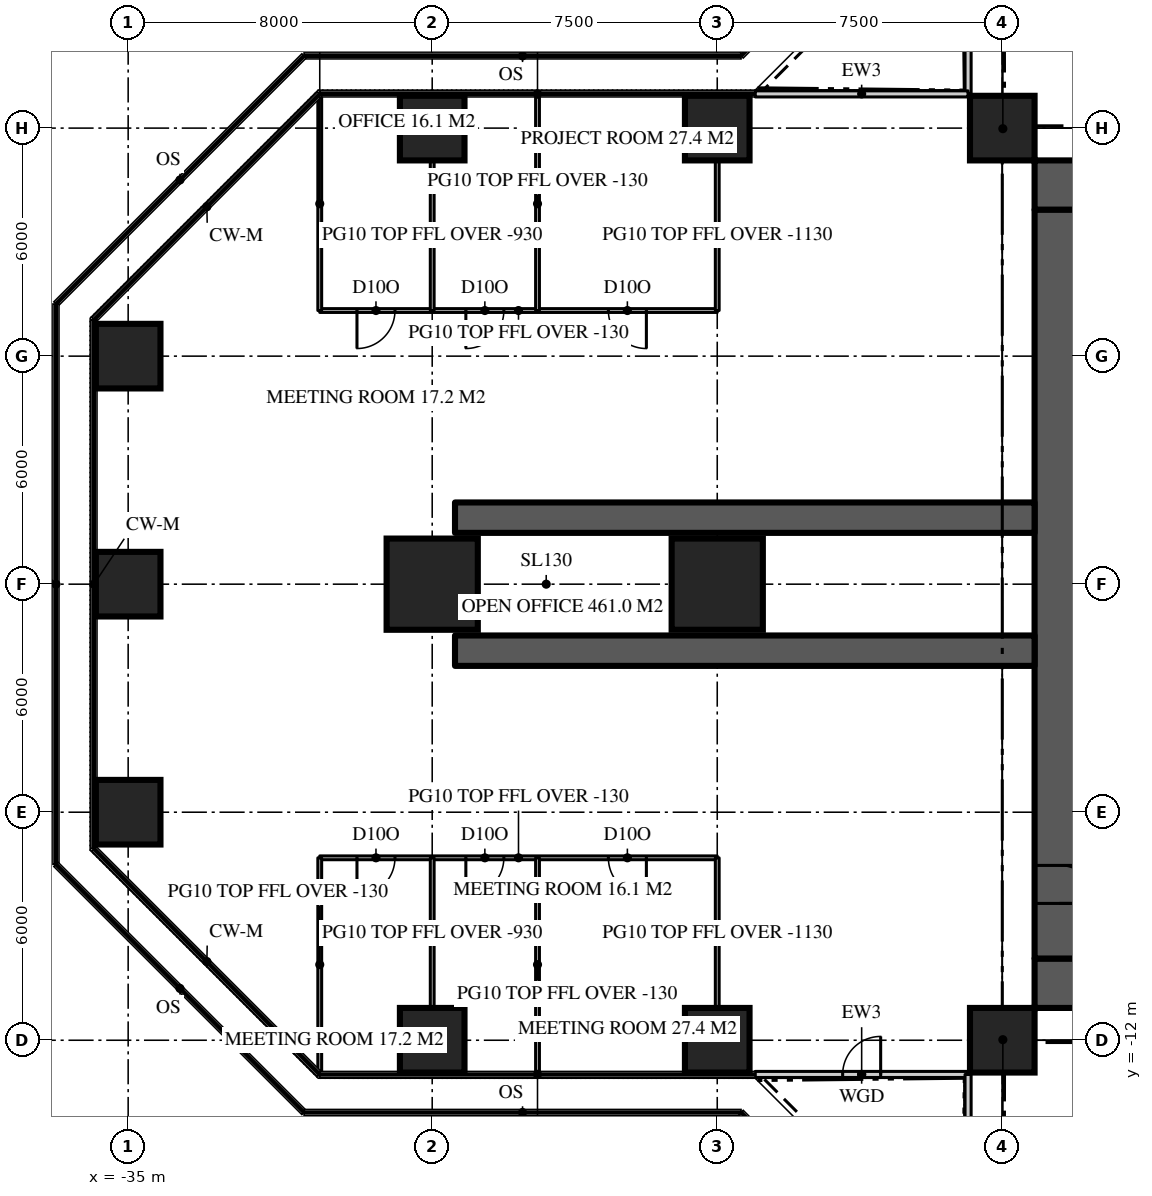
"""IFC4 building model, lengths in metres.
Left out: names, types, materials, properties, quantities, classifications, styles, units other than length and angle.
Written with IfcOpenShell. Run it as: python <this file> out.ifc"""

import sys

from ifc_helpers import new_model, si_unit, direction, frame, frame_2d, origin, origin_2d, place, context, subcontext, project, spatial, rectangle, extrude, element, fill, save


model = new_model("IFC4")
c1 = context("Model", 3, precision=1e-05, world=origin(), true_north=direction((0.0, 1.0)))
c2 = subcontext(c1, "Body", "Model", "MODEL_VIEW")
j1 = project(units=[si_unit("LENGTHUNIT", "METRE"), si_unit("PLANEANGLEUNIT", "RADIAN")], contexts=[c1])
p1 = place(None, origin())
s1 = spatial("IfcSite", under=j1, at=p1, CompositionType="ELEMENT")
p2 = place(p1, origin())
s2 = spatial("IfcBuilding", under=s1, at=p2, CompositionType="ELEMENT")
p3 = place(p2, frame((0.0, 0.0, 174.9)))
s3 = spatial("IfcBuildingStorey", under=s2, at=p3, CompositionType="ELEMENT", Elevation=174.9)
p4 = place(p3, frame((-11.15, 10.5, 0.0), z_axis=(0.0, 0.0, 1.0), x_axis=(1.0, 0.0, 0.0)))
e1 = element("IfcWall", 1, at=p4, inside=s3, PredefinedType="SHEAR", context=c2, shape_type="SweptSolid", body=[
    extrude(rectangle(XDim=22.3, YDim=1.3, at=frame_2d((11.15, 0.0))), origin(), (0.0, 0.0, 1.0), 3.9),
])
p5 = place(p4, frame((4.25, 0.0, 0.0)))
e2 = element("IfcOpeningElement", 2, at=p5, cuts=e1, PredefinedType="OPENING", context=c2, shape_type="SweptSolid", body=[
    extrude(rectangle(XDim=1.8, YDim=2.2, at=frame_2d((0.9, 1.1))), frame((0.0, 0.66, 0.0), z_axis=(0.0, -1.0, 0.0), x_axis=(1.0, 0.0, 0.0)), (0.0, 0.0, 1.0), 1.32),
])
p6 = place(p4, frame((16.25, 0.0, 0.0)))
e3 = element("IfcOpeningElement", 3, at=p6, cuts=e1, PredefinedType="OPENING", context=c2, shape_type="SweptSolid", body=[
    extrude(rectangle(XDim=1.8, YDim=2.2, at=frame_2d((0.9, 1.1))), frame((0.0, 0.66, 0.0), z_axis=(0.0, -1.0, 0.0), x_axis=(1.0, 0.0, 0.0)), (0.0, 0.0, 1.0), 1.32),
])
p7 = place(p3, frame((11.15, -10.5, 0.0), z_axis=(0.0, 0.0, 1.0), x_axis=(-1.0, 0.0, 0.0)))
e4 = element("IfcWall", 4, at=p7, inside=s3, PredefinedType="SHEAR", context=c2, shape_type="SweptSolid", body=[
    extrude(rectangle(XDim=22.3, YDim=1.3, at=frame_2d((11.15, 0.0))), origin(), (0.0, 0.0, 1.0), 3.9),
])
p8 = place(p7, frame((16.25, 0.0, 0.0)))
e5 = element("IfcOpeningElement", 5, at=p8, cuts=e4, PredefinedType="OPENING", context=c2, shape_type="SweptSolid", body=[
    extrude(rectangle(XDim=1.8, YDim=2.2, at=frame_2d((0.9, 1.1))), frame((0.0, 0.66, 0.0), z_axis=(0.0, -1.0, 0.0), x_axis=(1.0, 0.0, 0.0)), (0.0, 0.0, 1.0), 1.32),
])
p9 = place(p7, frame((4.25, 0.0, 0.0)))
e6 = element("IfcOpeningElement", 6, at=p9, cuts=e4, PredefinedType="OPENING", context=c2, shape_type="SweptSolid", body=[
    extrude(rectangle(XDim=1.8, YDim=2.2, at=frame_2d((0.9, 1.1))), frame((0.0, 0.66, 0.0), z_axis=(0.0, -1.0, 0.0), x_axis=(1.0, 0.0, 0.0)), (0.0, 0.0, 1.0), 1.32),
])
p10 = place(p3, frame((-10.5, 9.85, 0.0), z_axis=(0.0, 0.0, 1.0), x_axis=(0.0, -1.0, 0.0)))
e7 = element("IfcWall", 7, at=p10, inside=s3, PredefinedType="SHEAR", context=c2, shape_type="SweptSolid", body=[
    extrude(rectangle(XDim=19.7, YDim=1.3, at=frame_2d((9.85, 0.0))), origin(), (0.0, 0.0, 1.0), 3.9),
])
p11 = place(p10, frame((17.25, 0.0, 0.0)))
e8 = element("IfcOpeningElement", 8, at=p11, cuts=e7, PredefinedType="OPENING", context=c2, shape_type="SweptSolid", body=[
    extrude(rectangle(XDim=1.0, YDim=2.2, at=frame_2d((0.5, 1.1))), frame((0.0, 0.66, 0.0), z_axis=(0.0, -1.0, 0.0), x_axis=(1.0, 0.0, 0.0)), (0.0, 0.0, 1.0), 1.32),
])
for number, where, z_axis, x_axis in (
    (9, (-11.15, 1.75, 0.0), (0.0, 0.0, 1.0), (-1.0, 0.0, 0.0)),
    (10, (-11.15, -1.75, 0.0), (0.0, 0.0, 1.0), (-1.0, 0.0, 0.0)),
):
    element("IfcWall", number, at=place(p3, frame(where, z_axis=z_axis, x_axis=x_axis)), inside=s3, PredefinedType="SHEAR", context=c2, shape_type="SweptSolid", body=[
        extrude(rectangle(XDim=15.25, YDim=0.8, at=frame_2d((7.625, 0.0))), origin(), (0.0, 0.0, 1.0), 3.9),
    ])
for number, where, z_axis, x_axis in (
    (11, (-27.0, -12.0, 0.0), (0.0, 0.0, 1.0), (1.0, 0.0, 0.0)),
    (12, (-19.5, -12.0, 0.0), (0.0, 0.0, 1.0), (1.0, 0.0, 0.0)),
    (13, (-12.0, -12.0, 0.0), (0.0, 0.0, 1.0), (1.0, 0.0, 0.0)),
    (14, (-35.0, -6.0, 0.0), (0.0, 0.0, 1.0), (1.0, 0.0, 0.0)),
    (15, (-35.0, 0.0, 0.0), (0.0, 0.0, 1.0), (1.0, 0.0, 0.0)),
):
    element("IfcColumn", number, at=place(p3, frame(where, z_axis=z_axis, x_axis=x_axis)), inside=s3, PredefinedType="COLUMN", context=c2, shape_type="SweptSolid", body=[
        extrude(rectangle(XDim=1.7, YDim=1.7, at=origin_2d()), origin(), (0.0, 0.0, 1.0), 3.9),
    ])
for number, where, z_axis, x_axis in (
    (16, (-27.0, 0.0, 0.0), (0.0, 0.0, 1.0), (1.0, 0.0, 0.0)),
    (17, (-19.5, 0.0, 0.0), (0.0, 0.0, 1.0), (1.0, 0.0, 0.0)),
):
    element("IfcColumn", number, at=place(p3, frame(where, z_axis=z_axis, x_axis=x_axis)), inside=s3, PredefinedType="COLUMN", context=c2, shape_type="SweptSolid", body=[
        extrude(rectangle(XDim=2.4, YDim=2.4, at=origin_2d()), origin(), (0.0, 0.0, 1.0), 3.9),
    ])
for number, where, z_axis, x_axis in (
    (18, (-35.0, 6.0, 0.0), (0.0, 0.0, 1.0), (1.0, 0.0, 0.0)),
    (19, (-27.0, 12.0, 0.0), (0.0, 0.0, 1.0), (1.0, 0.0, 0.0)),
    (20, (-19.5, 12.0, 0.0), (0.0, 0.0, 1.0), (1.0, 0.0, 0.0)),
    (21, (-12.0, 12.0, 0.0), (0.0, 0.0, 1.0), (1.0, 0.0, 0.0)),
):
    element("IfcColumn", number, at=place(p3, frame(where, z_axis=z_axis, x_axis=x_axis)), inside=s3, PredefinedType="COLUMN", context=c2, shape_type="SweptSolid", body=[
        extrude(rectangle(XDim=1.7, YDim=1.7, at=origin_2d()), origin(), (0.0, 0.0, 1.0), 3.9),
    ])
p12 = place(p3, frame((-12.9, 18.5, 0.0), z_axis=(0.0, 0.0, 1.0), x_axis=(0.0, -1.0, 0.0)))
e22 = element("IfcWall", 22, at=p12, inside=s3, PredefinedType="SOLIDWALL", context=c2, shape_type="SweptSolid", body=[
    extrude(rectangle(XDim=5.6, YDim=0.16, at=frame_2d((2.8, 0.0))), origin(), (0.0, 0.0, 1.0), 3.77),
])
p13 = place(p12, frame((2.3, 0.0, 0.0)))
e23 = element("IfcOpeningElement", 23, at=p13, cuts=e22, PredefinedType="OPENING", context=c2, shape_type="SweptSolid", body=[
    extrude(rectangle(XDim=1.0, YDim=2.2, at=frame_2d((0.5, 1.1))), frame((0.0, 0.09, 0.0), z_axis=(0.0, -1.0, 0.0), x_axis=(1.0, 0.0, 0.0)), (0.0, 0.0, 1.0), 0.18),
])
p14 = place(p3, frame((-12.9, 12.9, 0.0), z_axis=(0.0, 0.0, 1.0), x_axis=(-1.0, 0.0, 0.0)))
e24 = element("IfcWall", 24, at=p14, inside=s3, PredefinedType="SOLIDWALL", context=c2, shape_type="SweptSolid", body=[
    extrude(rectangle(XDim=5.6, YDim=0.16, at=frame_2d((2.8, 0.0))), origin(), (0.0, 0.0, 1.0), 3.77),
])
p15 = place(p3, frame((-18.5, -12.9, 0.0), z_axis=(0.0, 0.0, 1.0), x_axis=(1.0, 0.0, 0.0)))
e25 = element("IfcWall", 25, at=p15, inside=s3, PredefinedType="SOLIDWALL", context=c2, shape_type="SweptSolid", body=[
    extrude(rectangle(XDim=5.6, YDim=0.16, at=frame_2d((2.8, 0.0))), origin(), (0.0, 0.0, 1.0), 3.77),
])
p16 = place(p15, frame((2.3, 0.0, 0.0)))
e26 = element("IfcOpeningElement", 26, at=p16, cuts=e25, PredefinedType="OPENING", context=c2, shape_type="SweptSolid", body=[
    extrude(rectangle(XDim=1.0, YDim=2.2, at=frame_2d((0.5, 1.1))), frame((0.0, 0.09, 0.0), z_axis=(0.0, -1.0, 0.0), x_axis=(1.0, 0.0, 0.0)), (0.0, 0.0, 1.0), 0.18),
])
p17 = place(p3, frame((-12.9, -12.9, 0.0), z_axis=(0.0, 0.0, 1.0), x_axis=(0.0, -1.0, 0.0)))
e27 = element("IfcWall", 27, at=p17, inside=s3, PredefinedType="SOLIDWALL", context=c2, shape_type="SweptSolid", body=[
    extrude(rectangle(XDim=5.6, YDim=0.16, at=frame_2d((2.8, 0.0))), origin(), (0.0, 0.0, 1.0), 3.77),
])
p18 = place(p3, frame((-19.5, -7.2, 0.0), z_axis=(0.0, 0.0, 1.0), x_axis=(-1.0, 0.0, 0.0)))
e28 = element("IfcWall", 28, at=p18, inside=s3, PredefinedType="PARTITIONING", context=c2, shape_type="SweptSolid", body=[
    extrude(rectangle(XDim=10.459, YDim=0.1, at=frame_2d((5.229, 0.0))), origin(), (0.0, 0.0, 1.0), 3.77),
])
p19 = place(p18, frame((1.865, 0.0, 0.0)))
e29 = element("IfcOpeningElement", 29, at=p19, cuts=e28, PredefinedType="OPENING", context=c2, shape_type="SweptSolid", body=[
    extrude(rectangle(XDim=1.0, YDim=2.2, at=frame_2d((0.5, 1.1))), frame((0.0, 0.06, 0.0), z_axis=(0.0, -1.0, 0.0), x_axis=(1.0, 0.0, 0.0)), (0.0, 0.0, 1.0), 0.12),
])
p20 = place(p18, frame((5.615, 0.0, 0.0)))
e30 = element("IfcOpeningElement", 30, at=p20, cuts=e28, PredefinedType="OPENING", context=c2, shape_type="SweptSolid", body=[
    extrude(rectangle(XDim=1.0, YDim=2.2, at=frame_2d((0.5, 1.1))), frame((0.0, 0.06, 0.0), z_axis=(0.0, -1.0, 0.0), x_axis=(1.0, 0.0, 0.0)), (0.0, 0.0, 1.0), 0.12),
])
p21 = place(p18, frame((8.479, 0.0, 0.0)))
e31 = element("IfcOpeningElement", 31, at=p21, cuts=e28, PredefinedType="OPENING", context=c2, shape_type="SweptSolid", body=[
    extrude(rectangle(XDim=1.0, YDim=2.2, at=frame_2d((0.5, 1.1))), frame((0.0, 0.06, 0.0), z_axis=(0.0, -1.0, 0.0), x_axis=(1.0, 0.0, 0.0)), (0.0, 0.0, 1.0), 0.12),
])
p22 = place(p3, frame((-19.5, -7.2, 0.0), z_axis=(0.0, 0.0, 1.0), x_axis=(0.0, -1.0, 0.0)))
e32 = element("IfcWall", 32, at=p22, inside=s3, PredefinedType="PARTITIONING", context=c2, shape_type="SweptSolid", body=[
    extrude(rectangle(XDim=3.95, YDim=0.1, at=frame_2d((1.975, 0.0))), origin(), (0.0, 0.0, 1.0), 2.77),
])
p23 = place(p3, frame((-24.229, -7.2, 0.0), z_axis=(0.0, 0.0, 1.0), x_axis=(0.0, -1.0, 0.0)))
e33 = element("IfcWall", 33, at=p23, inside=s3, PredefinedType="PARTITIONING", context=c2, shape_type="SweptSolid", body=[
    extrude(rectangle(XDim=5.62, YDim=0.1, at=frame_2d((2.81, 0.0))), origin(), (0.0, 0.0, 1.0), 3.77),
])
p24 = place(p3, frame((-27.0, -7.2, 0.0), z_axis=(0.0, 0.0, 1.0), x_axis=(0.0, -1.0, 0.0)))
e34 = element("IfcWall", 34, at=p24, inside=s3, PredefinedType="PARTITIONING", context=c2, shape_type="SweptSolid", body=[
    extrude(rectangle(XDim=3.95, YDim=0.1, at=frame_2d((1.975, 0.0))), origin(), (0.0, 0.0, 1.0), 2.97),
])
p25 = place(p3, frame((-29.959, -7.2, 0.0), z_axis=(0.0, 0.0, 1.0), x_axis=(0.0, -1.0, 0.0)))
e35 = element("IfcWall", 35, at=p25, inside=s3, PredefinedType="PARTITIONING", context=c2, shape_type="SweptSolid", body=[
    extrude(rectangle(XDim=5.62, YDim=0.1, at=frame_2d((2.81, 0.0))), origin(), (0.0, 0.0, 1.0), 3.77),
])
p26 = place(p3, frame((-19.5, 7.2, 0.0), z_axis=(0.0, 0.0, 1.0), x_axis=(-1.0, 0.0, 0.0)))
e36 = element("IfcWall", 36, at=p26, inside=s3, PredefinedType="PARTITIONING", context=c2, shape_type="SweptSolid", body=[
    extrude(rectangle(XDim=10.459, YDim=0.1, at=frame_2d((5.229, 0.0))), origin(), (0.0, 0.0, 1.0), 3.77),
])
p27 = place(p26, frame((1.865, 0.0, 0.0)))
e37 = element("IfcOpeningElement", 37, at=p27, cuts=e36, PredefinedType="OPENING", context=c2, shape_type="SweptSolid", body=[
    extrude(rectangle(XDim=1.0, YDim=2.2, at=frame_2d((0.5, 1.1))), frame((0.0, 0.06, 0.0), z_axis=(0.0, -1.0, 0.0), x_axis=(1.0, 0.0, 0.0)), (0.0, 0.0, 1.0), 0.12),
])
p28 = place(p26, frame((5.615, 0.0, 0.0)))
e38 = element("IfcOpeningElement", 38, at=p28, cuts=e36, PredefinedType="OPENING", context=c2, shape_type="SweptSolid", body=[
    extrude(rectangle(XDim=1.0, YDim=2.2, at=frame_2d((0.5, 1.1))), frame((0.0, 0.06, 0.0), z_axis=(0.0, -1.0, 0.0), x_axis=(1.0, 0.0, 0.0)), (0.0, 0.0, 1.0), 0.12),
])
p29 = place(p26, frame((8.479, 0.0, 0.0)))
e39 = element("IfcOpeningElement", 39, at=p29, cuts=e36, PredefinedType="OPENING", context=c2, shape_type="SweptSolid", body=[
    extrude(rectangle(XDim=1.0, YDim=2.2, at=frame_2d((0.5, 1.1))), frame((0.0, 0.06, 0.0), z_axis=(0.0, -1.0, 0.0), x_axis=(1.0, 0.0, 0.0)), (0.0, 0.0, 1.0), 0.12),
])
p30 = place(p3, frame((-19.5, 7.2, 0.0), z_axis=(0.0, 0.0, 1.0), x_axis=(0.0, 1.0, 0.0)))
e40 = element("IfcWall", 40, at=p30, inside=s3, PredefinedType="PARTITIONING", context=c2, shape_type="SweptSolid", body=[
    extrude(rectangle(XDim=3.95, YDim=0.1, at=frame_2d((1.975, 0.0))), origin(), (0.0, 0.0, 1.0), 2.77),
])
p31 = place(p3, frame((-24.229, 7.2, 0.0), z_axis=(0.0, 0.0, 1.0), x_axis=(0.0, 1.0, 0.0)))
e41 = element("IfcWall", 41, at=p31, inside=s3, PredefinedType="PARTITIONING", context=c2, shape_type="SweptSolid", body=[
    extrude(rectangle(XDim=5.62, YDim=0.1, at=frame_2d((2.81, 0.0))), origin(), (0.0, 0.0, 1.0), 3.77),
])
p32 = place(p3, frame((-27.0, 7.2, 0.0), z_axis=(0.0, 0.0, 1.0), x_axis=(0.0, 1.0, 0.0)))
e42 = element("IfcWall", 42, at=p32, inside=s3, PredefinedType="PARTITIONING", context=c2, shape_type="SweptSolid", body=[
    extrude(rectangle(XDim=3.95, YDim=0.1, at=frame_2d((1.975, 0.0))), origin(), (0.0, 0.0, 1.0), 2.97),
])
p33 = place(p3, frame((-29.959, 7.2, 0.0), z_axis=(0.0, 0.0, 1.0), x_axis=(0.0, 1.0, 0.0)))
e43 = element("IfcWall", 43, at=p33, inside=s3, PredefinedType="PARTITIONING", context=c2, shape_type="SweptSolid", body=[
    extrude(rectangle(XDim=5.62, YDim=0.1, at=frame_2d((2.81, 0.0))), origin(), (0.0, 0.0, 1.0), 3.77),
])
for number, where, z_axis, x_axis in (
    (44, (-11.15, 11.15, 0.0), (0.0, 0.0, 1.0), (-0.707, 0.707, 0.0)),
    (45, (-11.15, -11.15, 0.0), (0.0, 0.0, 1.0), (-0.707, -0.707, 0.0)),
):
    element("IfcWall", number, at=place(p3, frame(where, z_axis=z_axis, x_axis=x_axis)), inside=s3, PredefinedType="PARTITIONING", context=c2, shape_type="SweptSolid", body=[
        extrude(rectangle(XDim=2.362, YDim=0.15, at=frame_2d((1.181, 0.0))), origin(), (0.0, 0.0, 1.0), 3.22),
    ])
p34 = place(p16, origin())
e46 = element("IfcDoor", 46, at=p34, inside=s3, OperationType="SINGLE_SWING_RIGHT", PredefinedType="DOOR", context=c2, shape_type="SweptSolid", body=[
    extrude(rectangle(XDim=1.0, YDim=2.2, at=frame_2d((0.5, 1.1))), frame((0.0, 0.025, 0.0), z_axis=(0.0, -1.0, 0.0), x_axis=(1.0, 0.0, 0.0)), (0.0, 0.0, 1.0), 0.05),
])
fill(e26, e46)
p35 = place(p11, origin())
e47 = element("IfcDoor", 47, at=p35, inside=s3, OperationType="SINGLE_SWING_RIGHT", PredefinedType="DOOR", context=c2, shape_type="SweptSolid", body=[
    extrude(rectangle(XDim=1.0, YDim=2.2, at=frame_2d((0.5, 1.1))), frame((0.0, 0.025, 0.0), z_axis=(0.0, -1.0, 0.0), x_axis=(1.0, 0.0, 0.0)), (0.0, 0.0, 1.0), 0.05),
])
fill(e8, e47)
p36 = place(p19, origin())
e48 = element("IfcDoor", 48, at=p36, inside=s3, OperationType="SINGLE_SWING_LEFT", PredefinedType="DOOR", context=c2, shape_type="SweptSolid", body=[
    extrude(rectangle(XDim=1.0, YDim=2.2, at=frame_2d((0.5, 1.1))), frame((0.0, 0.025, 0.0), z_axis=(0.0, -1.0, 0.0), x_axis=(1.0, 0.0, 0.0)), (0.0, 0.0, 1.0), 0.05),
])
fill(e29, e48)
p37 = place(p20, origin())
e49 = element("IfcDoor", 49, at=p37, inside=s3, OperationType="SINGLE_SWING_RIGHT", PredefinedType="DOOR", context=c2, shape_type="SweptSolid", body=[
    extrude(rectangle(XDim=1.0, YDim=2.2, at=frame_2d((0.5, 1.1))), frame((0.0, 0.025, 0.0), z_axis=(0.0, -1.0, 0.0), x_axis=(1.0, 0.0, 0.0)), (0.0, 0.0, 1.0), 0.05),
])
fill(e30, e49)
p38 = place(p21, origin())
e50 = element("IfcDoor", 50, at=p38, inside=s3, OperationType="SINGLE_SWING_RIGHT", PredefinedType="DOOR", context=c2, shape_type="SweptSolid", body=[
    extrude(rectangle(XDim=1.0, YDim=2.2, at=frame_2d((0.5, 1.1))), frame((0.0, 0.025, 0.0), z_axis=(0.0, -1.0, 0.0), x_axis=(1.0, 0.0, 0.0)), (0.0, 0.0, 1.0), 0.05),
])
fill(e31, e50)
p39 = place(p27, origin())
e51 = element("IfcDoor", 51, at=p39, inside=s3, OperationType="SINGLE_SWING_LEFT", PredefinedType="DOOR", context=c2, shape_type="SweptSolid", body=[
    extrude(rectangle(XDim=1.0, YDim=2.2, at=frame_2d((0.5, 1.1))), frame((0.0, 0.025, 0.0), z_axis=(0.0, -1.0, 0.0), x_axis=(1.0, 0.0, 0.0)), (0.0, 0.0, 1.0), 0.05),
])
fill(e37, e51)
p40 = place(p28, origin())
e52 = element("IfcDoor", 52, at=p40, inside=s3, OperationType="SINGLE_SWING_RIGHT", PredefinedType="DOOR", context=c2, shape_type="SweptSolid", body=[
    extrude(rectangle(XDim=1.0, YDim=2.2, at=frame_2d((0.5, 1.1))), frame((0.0, 0.025, 0.0), z_axis=(0.0, -1.0, 0.0), x_axis=(1.0, 0.0, 0.0)), (0.0, 0.0, 1.0), 0.05),
])
fill(e38, e52)
p41 = place(p29, origin())
e53 = element("IfcDoor", 53, at=p41, inside=s3, OperationType="SINGLE_SWING_RIGHT", PredefinedType="DOOR", context=c2, shape_type="SweptSolid", body=[
    extrude(rectangle(XDim=1.0, YDim=2.2, at=frame_2d((0.5, 1.1))), frame((0.0, 0.025, 0.0), z_axis=(0.0, -1.0, 0.0), x_axis=(1.0, 0.0, 0.0)), (0.0, 0.0, 1.0), 0.05),
])
fill(e39, e53)
save(model, sys.argv[1])
